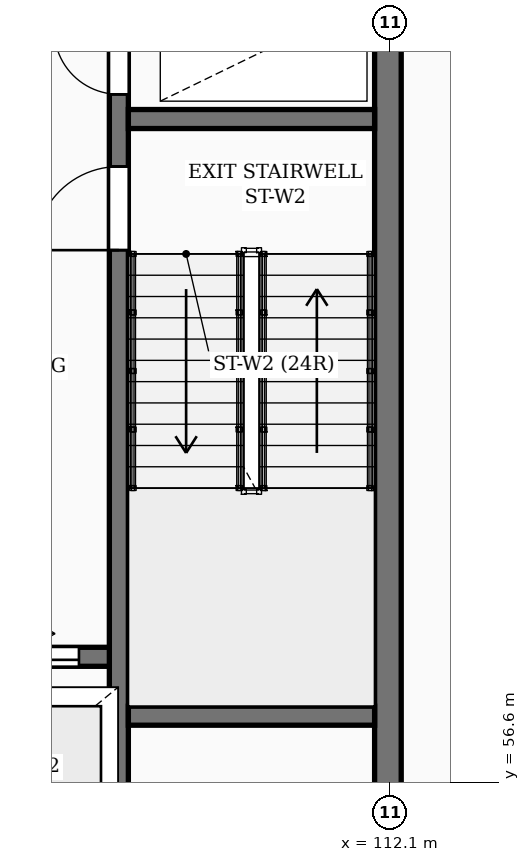
"""IFC4 building model, lengths in metres.
Left out: names, types, materials, properties, quantities, classifications, styles, units other than length and angle.
Written with IfcOpenShell. Run it as: python <this file> out.ifc"""

import sys

from ifc_helpers import new_model, si_unit, direction, frame, frame_2d, origin, place, context, subcontext, project, spatial, rectangle, extrude, element, fill, save


model = new_model("IFC4")
c1 = context("Model", 3, precision=1e-05, world=origin(), true_north=direction((0.0, 1.0)))
c2 = subcontext(c1, "Body", "Model", "MODEL_VIEW")
j1 = project(units=[si_unit("LENGTHUNIT", "METRE"), si_unit("PLANEANGLEUNIT", "RADIAN")], contexts=[c1])
p1 = place(None, origin())
s1 = spatial("IfcSite", under=j1, at=p1, CompositionType="ELEMENT")
p2 = place(p1, origin())
s2 = spatial("IfcBuilding", under=s1, at=p2, CompositionType="ELEMENT")
p3 = place(p2, frame((0.0, 0.0, 10.0)))
s3 = spatial("IfcBuildingStorey", under=s2, at=p3, CompositionType="ELEMENT", Elevation=10.0)
p4 = place(p3, frame((112.075, 55.375, 0.0), z_axis=(0.0, 0.0, 1.0), x_axis=(0.0, 1.0, 0.0)))
e1 = element("IfcWall", 1, at=p4, inside=s3, PredefinedType="SHEAR", context=c2, shape_type="SweptSolid", body=[
    extrude(rectangle(XDim=11.65, YDim=0.35, at=frame_2d((5.825, 0.0))), origin(), (0.0, 0.0, 1.0), 4.5),
])
p5 = place(p3, frame((106.22, 58.25, 0.0), z_axis=(0.0, 0.0, 1.0), x_axis=(1.0, 0.0, 0.0)))
e2 = element("IfcWall", 2, at=p5, inside=s3, PredefinedType="SHEAR", context=c2, shape_type="SweptSolid", body=[
    extrude(rectangle(XDim=2.46, YDim=0.25, at=frame_2d((1.23, 0.0))), origin(), (0.0, 0.0, 1.0), 4.5),
])
p6 = place(p5, frame((0.67, 0.0, 0.0)))
e3 = element("IfcOpeningElement", 3, at=p6, cuts=e2, PredefinedType="OPENING", context=c2, shape_type="SweptSolid", body=[
    extrude(rectangle(XDim=1.12, YDim=2.12, at=frame_2d((0.56, 1.06))), frame((0.0, 0.135, 0.0), z_axis=(0.0, -1.0, 0.0), x_axis=(1.0, 0.0, 0.0)), (0.0, 0.0, 1.0), 0.27),
])
p7 = place(p3, frame((108.535, 55.4, 0.0), z_axis=(0.0, 0.0, 1.0), x_axis=(0.0, 1.0, 0.0)))
e4 = element("IfcWall", 4, at=p7, inside=s3, PredefinedType="SHEAR", context=c2, shape_type="SweptSolid", body=[
    extrude(rectangle(XDim=11.6, YDim=0.25, at=frame_2d((5.8, 0.0))), origin(), (0.0, 0.0, 1.0), 4.5),
])
p8 = place(p7, frame((8.2, 0.0, 0.0)))
e5 = element("IfcOpeningElement", 5, at=p8, cuts=e4, PredefinedType="OPENING", context=c2, shape_type="SweptSolid", body=[
    extrude(rectangle(XDim=1.1, YDim=2.1, at=frame_2d((0.55, 1.05))), frame((0.0, 0.135, 0.0), z_axis=(0.0, -1.0, 0.0), x_axis=(1.0, 0.0, 0.0)), (0.0, 0.0, 1.0), 0.27),
])
p9 = place(p7, frame((10.25, 0.0, 0.0)))
e6 = element("IfcOpeningElement", 6, at=p9, cuts=e4, PredefinedType="OPENING", context=c2, shape_type="SweptSolid", body=[
    extrude(rectangle(XDim=0.85, YDim=2.05, at=frame_2d((0.425, 1.025))), frame((0.0, 0.135, 0.0), z_axis=(0.0, -1.0, 0.0), x_axis=(1.0, 0.0, 0.0)), (0.0, 0.0, 1.0), 0.27),
])
for number, where, z_axis, x_axis in (
    (7, (108.66, 57.475, 0.0), (0.0, 0.0, 1.0), (1.0, 0.0, 0.0)),
    (8, (108.66, 65.325, 0.0), (0.0, 0.0, 1.0), (1.0, 0.0, 0.0)),
):
    element("IfcWall", number, at=place(p3, frame(where, z_axis=z_axis, x_axis=x_axis)), inside=s3, PredefinedType="SHEAR", context=c2, shape_type="SweptSolid", body=[
        extrude(rectangle(XDim=3.24, YDim=0.25, at=frame_2d((1.62, 0.0))), origin(), (0.0, 0.0, 1.0), 4.5),
    ])
p10 = place(p6, origin())
e9 = element("IfcDoor", 9, at=p10, inside=s3, OperationType="SLIDING_TO_RIGHT", PredefinedType="DOOR", context=c2, shape_type="SweptSolid", body=[
    extrude(rectangle(XDim=1.12, YDim=2.12, at=frame_2d((0.56, 1.06))), frame((0.0, 0.025, 0.0), z_axis=(0.0, -1.0, 0.0), x_axis=(1.0, 0.0, 0.0)), (0.0, 0.0, 1.0), 0.05),
])
fill(e3, e9)
p11 = place(p8, origin())
e10 = element("IfcDoor", 10, at=p11, inside=s3, OperationType="SINGLE_SWING_LEFT", PredefinedType="DOOR", context=c2, shape_type="SweptSolid", body=[
    extrude(rectangle(XDim=1.1, YDim=2.1, at=frame_2d((0.55, 1.05))), frame((0.0, 0.025, 0.0), z_axis=(0.0, -1.0, 0.0), x_axis=(1.0, 0.0, 0.0)), (0.0, 0.0, 1.0), 0.05),
])
fill(e5, e10)
p12 = place(p9, origin())
e11 = element("IfcDoor", 11, at=p12, inside=s3, OperationType="SINGLE_SWING_RIGHT", PredefinedType="DOOR", context=c2, shape_type="SweptSolid", body=[
    extrude(rectangle(XDim=0.85, YDim=2.05, at=frame_2d((0.425, 1.025))), frame((0.0, 0.025, 0.0), z_axis=(0.0, -1.0, 0.0), x_axis=(1.0, 0.0, 0.0)), (0.0, 0.0, 1.0), 0.05),
])
fill(e6, e11)
save(model, sys.argv[1])
